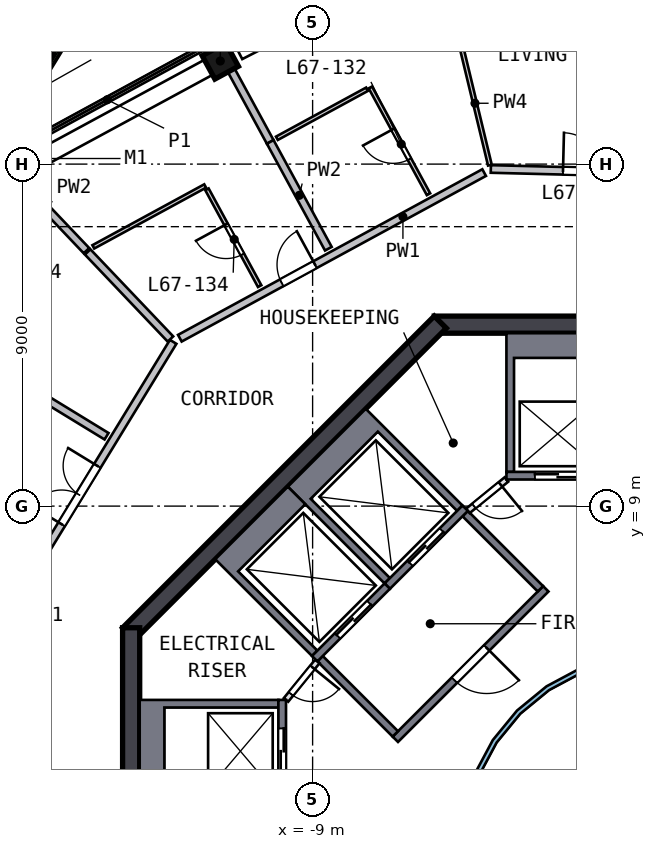
"""IFC4 building model, lengths in metres.
Left out: names, types, materials, properties, quantities, classifications, styles, units other than length and angle.
Written with IfcOpenShell. Run it as: python <this file> out.ifc"""

import sys

from ifc_helpers import new_model, si_unit, direction, frame, frame_2d, origin, origin_2d, place, context, subcontext, project, spatial, polyline, rectangle, outline, extrude, element, fill, save


model = new_model("IFC4")
c1 = context("Model", 3, precision=1e-05, world=origin(), true_north=direction((0.0, 1.0)))
c2 = subcontext(c1, "Body", "Model", "MODEL_VIEW")
j1 = project(units=[si_unit("LENGTHUNIT", "METRE"), si_unit("PLANEANGLEUNIT", "RADIAN")], contexts=[c1])
p1 = place(None, origin())
s1 = spatial("IfcSite", under=j1, at=p1, CompositionType="ELEMENT")
p2 = place(p1, origin())
s2 = spatial("IfcBuilding", under=s1, at=p2, CompositionType="ELEMENT")
p3 = place(p2, frame((0.0, 0.0, 274.0)))
s3 = spatial("IfcBuildingStorey", under=s2, at=p3, CompositionType="ELEMENT", Elevation=274.0)
p4 = place(p3, frame((-11.311, 20.78, 0.0), z_axis=(-0.0984061, -0.054678505, 0.993643045), x_axis=(-0.872632983, -0.475225292, -0.112572636)))
e1 = element("IfcColumn", 1, at=p4, inside=s3, PredefinedType="COLUMN", context=c2, shape_type="SweptSolid", body=[
    extrude(rectangle(XDim=0.7, YDim=0.7, at=origin_2d()), origin(), (0.0, 0.0, 1.0), 3.21),
])
p5 = place(p3, frame((5.799, 13.775, 0.0), z_axis=(0.0, 0.0, 1.0), x_axis=(-1.0, 0.0, 0.0)))
e2 = element("IfcWall", 2, at=p5, inside=s3, PredefinedType="SHEAR", context=c2, shape_type="SweptSolid", body=[
    extrude(rectangle(XDim=11.598, YDim=0.45, at=frame_2d((5.799, 0.0))), origin(), (0.0, 0.0, 1.0), 3.5),
])
p6 = place(p5, frame((4.899, 0.0, 0.0)))
e3 = element("IfcOpeningElement", 3, at=p6, cuts=e2, PredefinedType="OPENING", context=c2, shape_type="SweptSolid", body=[
    extrude(rectangle(XDim=1.8, YDim=2.1, at=frame_2d((0.9, 1.05))), frame((0.0, 0.235, 0.0), z_axis=(0.0, -1.0, 0.0), x_axis=(1.0, 0.0, 0.0)), (0.0, 0.0, 1.0), 0.47),
])
p7 = place(p3, frame((-5.64, 13.841, 0.0), z_axis=(0.0, 0.0, 1.0), x_axis=(-0.707106781, -0.707106781, 0.0)))
e4 = element("IfcWall", 4, at=p7, inside=s3, PredefinedType="SHEAR", context=c2, shape_type="SweptSolid", body=[
    extrude(rectangle(XDim=11.598, YDim=0.45, at=frame_2d((5.799, 0.0))), origin(), (0.0, 0.0, 1.0), 3.5),
])
p8 = place(p3, frame((-13.775, 5.799, 0.0), z_axis=(0.0, 0.0, 1.0), x_axis=(0.0, -1.0, 0.0)))
e5 = element("IfcWall", 5, at=p8, inside=s3, PredefinedType="SHEAR", context=c2, shape_type="SweptSolid", body=[
    extrude(rectangle(XDim=11.598, YDim=0.45, at=frame_2d((5.799, 0.0))), origin(), (0.0, 0.0, 1.0), 3.5),
])
p9 = place(p8, frame((4.899, 0.0, 0.0)))
e6 = element("IfcOpeningElement", 6, at=p9, cuts=e5, PredefinedType="OPENING", context=c2, shape_type="SweptSolid", body=[
    extrude(rectangle(XDim=1.8, YDim=2.1, at=frame_2d((0.9, 1.05))), frame((0.0, 0.235, 0.0), z_axis=(0.0, -1.0, 0.0), x_axis=(1.0, 0.0, 0.0)), (0.0, 0.0, 1.0), 0.47),
])
p10 = place(p3, frame((-17.519, 18.33, 0.0), z_axis=(0.0, 0.0, 1.0), x_axis=(0.521638307, 0.853166735, 0.0)))
e7 = element("IfcWall", 7, at=p10, inside=s3, PredefinedType="SOLIDWALL", context=c2, shape_type="SweptSolid", body=[
    extrude(rectangle(XDim=3.199, YDim=0.5, at=frame_2d((1.6, 0.0))), origin(), (0.0, 0.0, 1.0), 0.7),
])
p11 = place(p3, origin())
e8 = element("IfcWall", 8, at=p11, inside=s3, PredefinedType="SOLIDWALL", context=c2, shape_type="SweptSolid", body=[
    extrude(outline(polyline([(-3.9, 13.55), (-1.2, 13.55), (-1.2, 9.9), (-1.4, 9.9), (-1.4, 12.9), (-3.7, 12.9), (-3.7, 9.9), (-3.9, 9.9), (-3.9, 13.55)])), origin(), (0.0, 0.0, 1.0), 3.19),
])
p12 = place(p3, frame((-1.2, 9.8, 0.0), z_axis=(0.0, 0.0, 1.0), x_axis=(-1.0, 0.0, 0.0)))
e9 = element("IfcWall", 9, at=p12, inside=s3, PredefinedType="SOLIDWALL", context=c2, shape_type="SweptSolid", body=[
    extrude(rectangle(XDim=2.7, YDim=0.2, at=frame_2d((1.35, 0.0))), origin(), (0.0, 0.0, 1.0), 3.19),
])
p13 = place(p12, frame((0.75, 0.0, 0.0)))
e10 = element("IfcOpeningElement", 10, at=p13, cuts=e9, PredefinedType="OPENING", context=c2, shape_type="SweptSolid", body=[
    extrude(rectangle(XDim=1.2, YDim=2.1, at=frame_2d((0.6, 1.05))), frame((0.0, 0.11, 0.0), z_axis=(0.0, -1.0, 0.0), x_axis=(1.0, 0.0, 0.0)), (0.0, 0.0, 1.0), 0.22),
])
p14 = place(p3, origin())
e11 = element("IfcWall", 11, at=p14, inside=s3, PredefinedType="SOLIDWALL", context=c2, shape_type="SweptSolid", body=[
    extrude(outline(polyline([(-13.55, 3.9), (-9.9, 3.9), (-9.9, 3.7), (-12.9, 3.7), (-12.9, 1.4), (-9.9, 1.4), (-9.9, 1.2), (-13.55, 1.2), (-13.55, 3.9)])), origin(), (0.0, 0.0, 1.0), 3.19),
])
p15 = place(p3, frame((-9.8, 1.2, 0.0), z_axis=(0.0, 0.0, 1.0), x_axis=(0.0, 1.0, 0.0)))
e12 = element("IfcWall", 12, at=p15, inside=s3, PredefinedType="SOLIDWALL", context=c2, shape_type="SweptSolid", body=[
    extrude(rectangle(XDim=2.7, YDim=0.2, at=frame_2d((1.35, 0.0))), origin(), (0.0, 0.0, 1.0), 3.19),
])
p16 = place(p15, frame((0.75, 0.0, 0.0)))
e13 = element("IfcOpeningElement", 13, at=p16, cuts=e12, PredefinedType="OPENING", context=c2, shape_type="SweptSolid", body=[
    extrude(rectangle(XDim=1.2, YDim=2.1, at=frame_2d((0.6, 1.05))), frame((0.0, 0.11, 0.0), z_axis=(0.0, -1.0, 0.0), x_axis=(1.0, 0.0, 0.0)), (0.0, 0.0, 1.0), 0.22),
])
p17 = place(p3, origin())
e14 = element("IfcWall", 14, at=p17, inside=s3, PredefinedType="SOLIDWALL", context=c2, shape_type="SweptSolid", body=[
    extrude(outline(polyline([(-9.652, 9.51), (-7.601, 11.561), (-5.056, 9.016), (-5.197, 8.874), (-7.283, 10.96), (-9.051, 9.192), (-6.965, 7.106), (-7.106, 6.965), (-9.652, 9.51)])), origin(), (0.0, 0.0, 1.0), 3.19),
])
p18 = place(p3, frame((-4.985, 8.945, 0.0), z_axis=(0.0, 0.0, 1.0), x_axis=(-0.707106781, -0.707106781, 0.0)))
e15 = element("IfcWall", 15, at=p18, inside=s3, PredefinedType="SOLIDWALL", context=c2, shape_type="SweptSolid", body=[
    extrude(rectangle(XDim=2.9, YDim=0.2, at=frame_2d((1.45, 0.0))), origin(), (0.0, 0.0, 1.0), 3.19),
])
p19 = place(p18, frame((0.85, 0.0, 0.0)))
e16 = element("IfcOpeningElement", 16, at=p19, cuts=e15, PredefinedType="OPENING", context=c2, shape_type="SweptSolid", body=[
    extrude(rectangle(XDim=1.2, YDim=2.1, at=frame_2d((0.6, 1.05))), frame((0.0, 0.11, 0.0), z_axis=(0.0, -1.0, 0.0), x_axis=(1.0, 0.0, 0.0)), (0.0, 0.0, 1.0), 0.22),
])
p20 = place(p3, origin())
e17 = element("IfcWall", 17, at=p20, inside=s3, PredefinedType="SOLIDWALL", context=c2, shape_type="SweptSolid", body=[
    extrude(outline(polyline([(-11.561, 7.601), (-9.652, 9.51), (-9.192, 9.051), (-10.96, 7.283), (-8.874, 5.197), (-9.016, 5.056), (-11.561, 7.601)])), origin(), (0.0, 0.0, 1.0), 3.19),
])
p21 = place(p3, frame((-7.036, 6.894, 0.0), z_axis=(0.0, 0.0, 1.0), x_axis=(-0.707106781, -0.707106781, 0.0)))
e18 = element("IfcWall", 18, at=p21, inside=s3, PredefinedType="SOLIDWALL", context=c2, shape_type="SweptSolid", body=[
    extrude(rectangle(XDim=2.7, YDim=0.2, at=frame_2d((1.35, 0.0))), origin(), (0.0, 0.0, 1.0), 3.19),
])
p22 = place(p21, frame((0.65, 0.0, 0.0)))
e19 = element("IfcOpeningElement", 19, at=p22, cuts=e18, PredefinedType="OPENING", context=c2, shape_type="SweptSolid", body=[
    extrude(rectangle(XDim=1.2, YDim=2.1, at=frame_2d((0.6, 1.05))), frame((0.0, 0.11, 0.0), z_axis=(0.0, -1.0, 0.0), x_axis=(1.0, 0.0, 0.0)), (0.0, 0.0, 1.0), 0.22),
])
p23 = place(p3, frame((-2.864, 6.823, 0.0), z_axis=(0.0, 0.0, 1.0), x_axis=(-0.707106781, -0.707106781, 0.0)))
e20 = element("IfcWall", 20, at=p23, inside=s3, PredefinedType="SOLIDWALL", context=c2, shape_type="SweptSolid", body=[
    extrude(rectangle(XDim=5.6, YDim=0.2, at=frame_2d((2.8, 0.0))), origin(), (0.0, 0.0, 1.0), 3.19),
])
p24 = place(p23, frame((2.2, 0.0, 0.0)))
e21 = element("IfcOpeningElement", 21, at=p24, cuts=e20, PredefinedType="OPENING", context=c2, shape_type="SweptSolid", body=[
    extrude(rectangle(XDim=1.2, YDim=2.1, at=frame_2d((0.6, 1.05))), frame((0.0, 0.11, 0.0), z_axis=(0.0, -1.0, 0.0), x_axis=(1.0, 0.0, 0.0)), (0.0, 0.0, 1.0), 0.22),
])
for number, where, z_axis, x_axis in (
    (22, (-3.005, 6.823, 0.0), (0.0, 0.0, 1.0), (-0.707, 0.707, 0.0)),
    (23, (-6.823, 3.005, 0.0), (0.0, 0.0, 1.0), (-0.707, 0.707, 0.0)),
):
    element("IfcWall", number, at=place(p3, frame(where, z_axis=z_axis, x_axis=x_axis)), inside=s3, PredefinedType="SOLIDWALL", context=c2, shape_type="SweptSolid", body=[
        extrude(rectangle(XDim=2.8, YDim=0.2, at=frame_2d((1.4, 0.0))), origin(), (0.0, 0.0, 1.0), 3.19),
    ])
p25 = place(p3, frame((-3.9, 9.7, 0.0), z_axis=(0.0, 0.0, 1.0), x_axis=(-0.775559878, -0.631274009, 0.0)))
e24 = element("IfcWall", 24, at=p25, inside=s3, PredefinedType="PARTITIONING", context=c2, shape_type="SweptSolid", body=[
    extrude(rectangle(XDim=1.308, YDim=0.15, at=frame_2d((0.654, 0.0))), origin(), (0.0, 0.0, 1.0), 3.19),
])
p26 = place(p25, frame((0.204, 0.0, 0.0)))
e25 = element("IfcOpeningElement", 25, at=p26, cuts=e24, PredefinedType="OPENING", context=c2, shape_type="SweptSolid", body=[
    extrude(rectangle(XDim=0.9, YDim=2.1, at=frame_2d((0.45, 1.05))), frame((0.0, 0.085, 0.0), z_axis=(0.0, -1.0, 0.0), x_axis=(1.0, 0.0, 0.0)), (0.0, 0.0, 1.0), 0.17),
])
p27 = place(p3, frame((-8.874, 4.914, 0.0), z_axis=(0.0, 0.0, 1.0), x_axis=(-0.631274009, -0.775559878, 0.0)))
e26 = element("IfcWall", 26, at=p27, inside=s3, PredefinedType="PARTITIONING", context=c2, shape_type="SweptSolid", body=[
    extrude(rectangle(XDim=1.308, YDim=0.15, at=frame_2d((0.654, 0.0))), origin(), (0.0, 0.0, 1.0), 3.19),
])
p28 = place(p27, frame((0.204, 0.0, 0.0)))
e27 = element("IfcOpeningElement", 27, at=p28, cuts=e26, PredefinedType="OPENING", context=c2, shape_type="SweptSolid", body=[
    extrude(rectangle(XDim=0.9, YDim=2.1, at=frame_2d((0.45, 1.05))), frame((0.0, 0.085, 0.0), z_axis=(0.0, -1.0, 0.0), x_axis=(1.0, 0.0, 0.0)), (0.0, 0.0, 1.0), 0.17),
])
p29 = place(p3, origin())
e28 = element("IfcWall", 28, at=p29, inside=s3, PredefinedType="SOLIDWALL", context=c2, shape_type="SweptSolid", body=[
    extrude(outline(polyline([(5.021, -0.999), (4.73, -1.959), (4.257, -2.844), (3.62, -3.62), (2.844, -4.257), (1.959, -4.73), (0.999, -5.021), (0.0, -5.12), (-0.999, -5.021), (-1.959, -4.73), (-2.844, -4.257), (-3.62, -3.62), (-4.257, -2.844), (-4.73, -1.959), (-5.021, -0.999), (-5.12, 0.0), (-5.021, 0.999), (-4.73, 1.959), (-4.257, 2.844), (-3.62, 3.62), (-2.844, 4.257), (-1.959, 4.73), (-0.999, 5.021), (0.0, 5.12), (0.999, 5.021), (1.959, 4.73), (2.844, 4.257), (3.62, 3.62), (4.257, 2.844), (4.73, 1.959), (5.021, 0.999), (5.12, 0.0), (5.021, -0.999)]), holes=[polyline([(4.904, 0.976), (4.619, 1.913), (4.157, 2.778), (3.535, 3.535), (2.778, 4.157), (1.913, 4.619), (0.976, 4.904), (0.0, 5.0), (-0.976, 4.904), (-1.913, 4.619), (-2.778, 4.157), (-3.535, 3.535), (-4.157, 2.778), (-4.619, 1.913), (-4.904, 0.976), (-5.0, 0.0), (-4.904, -0.976), (-4.619, -1.913), (-4.157, -2.778), (-3.535, -3.535), (-2.778, -4.157), (-1.913, -4.619), (-0.976, -4.904), (0.0, -5.0), (0.976, -4.904), (1.913, -4.619), (2.778, -4.157), (3.535, -3.535), (4.157, -2.778), (4.619, -1.913), (4.904, -0.976), (5.0, 0.0), (4.904, 0.976)])]), origin(), (0.0, 0.0, 1.0), 3.19),
])
p30 = place(p3, frame((-17.644, 5.186, 0.0), z_axis=(0.0, 0.0, 1.0), x_axis=(0.521608435, 0.853184998, 0.0)))
e29 = element("IfcWall", 29, at=p30, inside=s3, PredefinedType="SOLIDWALL", context=c2, shape_type="SweptSolid", body=[
    extrude(rectangle(XDim=9.537, YDim=0.2, at=frame_2d((4.768, 0.0))), origin(), (0.0, 0.0, 1.0), 3.19),
])
p31 = place(p30, frame((3.912, 0.0, 0.0)))
e30 = element("IfcOpeningElement", 30, at=p31, cuts=e29, PredefinedType="OPENING", context=c2, shape_type="SweptSolid", body=[
    extrude(rectangle(XDim=1.8, YDim=2.1, at=frame_2d((0.9, 1.05))), frame((0.0, 0.11, 0.0), z_axis=(0.0, -1.0, 0.0), x_axis=(1.0, 0.0, 0.0)), (0.0, 0.0, 1.0), 0.22),
])
p32 = place(p3, frame((-12.493, 13.418, 0.0), z_axis=(0.0, 0.0, 1.0), x_axis=(0.878320972, 0.478071407, 0.0)))
e31 = element("IfcWall", 31, at=p32, inside=s3, PredefinedType="SOLIDWALL", context=c2, shape_type="SweptSolid", body=[
    extrude(rectangle(XDim=9.117, YDim=0.2, at=frame_2d((4.558, 0.0))), origin(), (0.0, 0.0, 1.0), 3.19),
])
p33 = place(p32, frame((3.05, 0.0, 0.0)))
e32 = element("IfcOpeningElement", 32, at=p33, cuts=e31, PredefinedType="OPENING", context=c2, shape_type="SweptSolid", body=[
    extrude(rectangle(XDim=1.0, YDim=2.1, at=frame_2d((0.5, 1.05))), frame((0.0, 0.11, 0.0), z_axis=(0.0, -1.0, 0.0), x_axis=(1.0, 0.0, 0.0)), (0.0, 0.0, 1.0), 0.22),
])
p34 = place(p3, frame((-4.311, 17.872, 0.0), z_axis=(0.0, 0.0, 1.0), x_axis=(0.99968415, -0.025131651, 0.0)))
e33 = element("IfcWall", 33, at=p34, inside=s3, PredefinedType="SOLIDWALL", context=c2, shape_type="SweptSolid", body=[
    extrude(rectangle(XDim=9.316, YDim=0.2, at=frame_2d((4.658, 0.0))), origin(), (0.0, 0.0, 1.0), 3.19),
])
p35 = place(p34, frame((1.9, 0.0, 0.0)))
e34 = element("IfcOpeningElement", 34, at=p35, cuts=e33, PredefinedType="OPENING", context=c2, shape_type="SweptSolid", body=[
    extrude(rectangle(XDim=1.0, YDim=2.1, at=frame_2d((0.5, 1.05))), frame((0.0, 0.11, 0.0), z_axis=(0.0, -1.0, 0.0), x_axis=(1.0, 0.0, 0.0)), (0.0, 0.0, 1.0), 0.22),
])
p36 = place(p3, frame((-23.212, 16.212, 0.0), z_axis=(0.0, 0.0, 1.0), x_axis=(0.853189263, -0.521601458, 0.0)))
e35 = element("IfcWall", 35, at=p36, inside=s3, PredefinedType="SOLIDWALL", context=c2, shape_type="SweptSolid", body=[
    extrude(rectangle(XDim=10.302, YDim=0.2, at=frame_2d((5.151, 0.0))), origin(), (0.0, 0.0, 1.0), 3.19),
])
p37 = place(p36, frame((2.5, 0.0, 0.0)))
e36 = element("IfcOpeningElement", 36, at=p37, cuts=e35, PredefinedType="OPENING", context=c2, shape_type="SweptSolid", body=[
    extrude(rectangle(XDim=1.0, YDim=2.1, at=frame_2d((0.5, 1.05))), frame((0.0, 0.11, 0.0), z_axis=(0.0, -1.0, 0.0), x_axis=(1.0, 0.0, 0.0)), (0.0, 0.0, 1.0), 0.22),
])
p38 = place(p3, frame((-17.203, 18.09, 0.0), z_axis=(0.0, 0.0, 1.0), x_axis=(0.689106643, -0.724659944, 0.0)))
e37 = element("IfcWall", 37, at=p38, inside=s3, PredefinedType="SOLIDWALL", context=c2, shape_type="SweptSolid", body=[
    extrude(rectangle(XDim=3.269, YDim=0.2, at=frame_2d((1.634, 0.0))), origin(), (0.0, 0.0, 1.0), 3.19),
])
p39 = place(p3, frame((-14.919, 15.688, 0.0), z_axis=(0.0, 0.0, 1.0), x_axis=(0.689161356, -0.724607912, 0.0)))
e38 = element("IfcWall", 38, at=p39, inside=s3, PredefinedType="SOLIDWALL", context=c2, shape_type="SweptSolid", body=[
    extrude(rectangle(XDim=3.161, YDim=0.2, at=frame_2d((1.581, 0.0))), origin(), (0.0, 0.0, 1.0), 3.19),
])
p40 = place(p3, frame((-10.115, 18.584, 0.0), z_axis=(0.0, 0.0, 1.0), x_axis=(-0.478092371, 0.878309561, 0.0)))
e39 = element("IfcWall", 39, at=p40, inside=s3, PredefinedType="SOLIDWALL", context=c2, shape_type="SweptSolid", body=[
    extrude(rectangle(XDim=2.95, YDim=0.2, at=frame_2d((1.475, 0.0))), origin(), (0.0, 0.0, 1.0), 3.19),
])
p41 = place(p3, frame((-8.585, 15.773, 0.0), z_axis=(0.0, 0.0, 1.0), x_axis=(-0.478071486, 0.878320929, 0.0)))
e40 = element("IfcWall", 40, at=p41, inside=s3, PredefinedType="SOLIDWALL", context=c2, shape_type="SweptSolid", body=[
    extrude(rectangle(XDim=3.2, YDim=0.2, at=frame_2d((1.6, 0.0))), origin(), (0.0, 0.0, 1.0), 3.19),
])
p42 = place(p3, frame((-14.77, 15.822, 0.0), z_axis=(0.0, 0.0, 1.0), x_axis=(0.878304625, 0.478101439, 0.0)))
e41 = element("IfcWall", 41, at=p42, inside=s3, PredefinedType="PARTITIONING", context=c2, shape_type="SweptSolid", body=[
    extrude(rectangle(XDim=3.35, YDim=0.1, at=frame_2d((1.675, 0.0))), origin(), (0.0, 0.0, 1.0), 3.19),
])
p43 = place(p3, frame((-10.393, 14.789, 0.0), z_axis=(0.0, 0.0, 1.0), x_axis=(-0.478091061, 0.878310274, 0.0)))
e42 = element("IfcWall", 42, at=p43, inside=s3, PredefinedType="PARTITIONING", context=c2, shape_type="SweptSolid", body=[
    extrude(rectangle(XDim=2.9, YDim=0.1, at=frame_2d((1.45, 0.0))), origin(), (0.0, 0.0, 1.0), 3.19),
])
p44 = place(p43, frame((0.95, 0.0, 0.0)))
e43 = element("IfcOpeningElement", 43, at=p44, cuts=e42, PredefinedType="OPENING", context=c2, shape_type="SweptSolid", body=[
    extrude(rectangle(XDim=0.9, YDim=2.1, at=frame_2d((0.45, 1.05))), frame((0.0, 0.06, 0.0), z_axis=(0.0, -1.0, 0.0), x_axis=(1.0, 0.0, 0.0)), (0.0, 0.0, 1.0), 0.12),
])
p45 = place(p3, frame((-7.568, 19.97, 0.0), z_axis=(0.0, 0.0, 1.0), x_axis=(-0.878296088, -0.478117121, 0.0)))
e44 = element("IfcWall", 44, at=p45, inside=s3, PredefinedType="PARTITIONING", context=c2, shape_type="SweptSolid", body=[
    extrude(rectangle(XDim=2.7, YDim=0.1, at=frame_2d((1.35, 0.0))), origin(), (0.0, 0.0, 1.0), 3.19),
])
p46 = place(p3, frame((-5.95, 17.207, 0.0), z_axis=(0.0, 0.0, 1.0), x_axis=(-0.478098304, 0.878306331, 0.0)))
e45 = element("IfcWall", 45, at=p46, inside=s3, PredefinedType="PARTITIONING", context=c2, shape_type="SweptSolid", body=[
    extrude(rectangle(XDim=3.2, YDim=0.1, at=frame_2d((1.6, 0.0))), origin(), (0.0, 0.0, 1.0), 3.19),
])
p47 = place(p46, frame((1.05, 0.0, 0.0)))
e46 = element("IfcOpeningElement", 46, at=p47, cuts=e45, PredefinedType="OPENING", context=c2, shape_type="SweptSolid", body=[
    extrude(rectangle(XDim=0.9, YDim=2.1, at=frame_2d((0.45, 1.05))), frame((0.0, 0.06, 0.0), z_axis=(0.0, -1.0, 0.0), x_axis=(1.0, 0.0, 0.0)), (0.0, 0.0, 1.0), 0.12),
])
p48 = place(p3, frame((-4.335, 17.973, 0.0), z_axis=(0.0, 0.0, 1.0), x_axis=(-0.234490664, 0.972118372, 0.0)))
e47 = element("IfcWall", 47, at=p48, inside=s3, PredefinedType="PARTITIONING", context=c2, shape_type="SweptSolid", body=[
    extrude(rectangle(XDim=6.476, YDim=0.1, at=frame_2d((3.238, 0.0))), origin(), (0.0, 0.0, 1.0), 3.19),
])
p49 = place(p48, frame((3.55, 0.0, 0.0)))
e48 = element("IfcOpeningElement", 48, at=p49, cuts=e47, PredefinedType="OPENING", context=c2, shape_type="SweptSolid", body=[
    extrude(rectangle(XDim=1.0, YDim=2.1, at=frame_2d((0.5, 1.05))), frame((0.0, 0.06, 0.0), z_axis=(0.0, -1.0, 0.0), x_axis=(1.0, 0.0, 0.0)), (0.0, 0.0, 1.0), 0.12),
])
p50 = place(p13, origin())
e49 = element("IfcDoor", 49, at=p50, inside=s3, OperationType="DOUBLE_DOOR_SLIDING", PredefinedType="DOOR", context=c2, shape_type="SweptSolid", body=[
    extrude(rectangle(XDim=1.2, YDim=2.1, at=frame_2d((0.6, 1.05))), frame((0.0, 0.025, 0.0), z_axis=(0.0, -1.0, 0.0), x_axis=(1.0, 0.0, 0.0)), (0.0, 0.0, 1.0), 0.05),
])
fill(e10, e49)
p51 = place(p16, origin())
e50 = element("IfcDoor", 50, at=p51, inside=s3, OperationType="DOUBLE_DOOR_SLIDING", PredefinedType="DOOR", context=c2, shape_type="SweptSolid", body=[
    extrude(rectangle(XDim=1.2, YDim=2.1, at=frame_2d((0.6, 1.05))), frame((0.0, 0.025, 0.0), z_axis=(0.0, -1.0, 0.0), x_axis=(1.0, 0.0, 0.0)), (0.0, 0.0, 1.0), 0.05),
])
fill(e13, e50)
p52 = place(p19, origin())
e51 = element("IfcDoor", 51, at=p52, inside=s3, OperationType="DOUBLE_DOOR_SLIDING", PredefinedType="DOOR", context=c2, shape_type="SweptSolid", body=[
    extrude(rectangle(XDim=1.2, YDim=2.1, at=frame_2d((0.6, 1.05))), frame((0.0, 0.025, 0.0), z_axis=(0.0, -1.0, 0.0), x_axis=(1.0, 0.0, 0.0)), (0.0, 0.0, 1.0), 0.05),
])
fill(e16, e51)
p53 = place(p22, origin())
e52 = element("IfcDoor", 52, at=p53, inside=s3, OperationType="DOUBLE_DOOR_SLIDING", PredefinedType="DOOR", context=c2, shape_type="SweptSolid", body=[
    extrude(rectangle(XDim=1.2, YDim=2.1, at=frame_2d((0.6, 1.05))), frame((0.0, 0.025, 0.0), z_axis=(0.0, -1.0, 0.0), x_axis=(1.0, 0.0, 0.0)), (0.0, 0.0, 1.0), 0.05),
])
fill(e19, e52)
p54 = place(p24, origin())
e53 = element("IfcDoor", 53, at=p54, inside=s3, OperationType="SINGLE_SWING_LEFT", PredefinedType="DOOR", context=c2, shape_type="SweptSolid", body=[
    extrude(rectangle(XDim=1.2, YDim=2.1, at=frame_2d((0.6, 1.05))), frame((0.0, 0.025, 0.0), z_axis=(0.0, -1.0, 0.0), x_axis=(1.0, 0.0, 0.0)), (0.0, 0.0, 1.0), 0.05),
])
fill(e21, e53)
p55 = place(p26, origin())
e54 = element("IfcDoor", 54, at=p55, inside=s3, OperationType="SINGLE_SWING_LEFT", PredefinedType="DOOR", context=c2, shape_type="SweptSolid", body=[
    extrude(rectangle(XDim=0.9, YDim=2.1, at=frame_2d((0.45, 1.05))), frame((0.0, 0.025, 0.0), z_axis=(0.0, -1.0, 0.0), x_axis=(1.0, 0.0, 0.0)), (0.0, 0.0, 1.0), 0.05),
])
fill(e25, e54)
p56 = place(p28, origin())
e55 = element("IfcDoor", 55, at=p56, inside=s3, OperationType="SINGLE_SWING_LEFT", PredefinedType="DOOR", context=c2, shape_type="SweptSolid", body=[
    extrude(rectangle(XDim=0.9, YDim=2.1, at=frame_2d((0.45, 1.05))), frame((0.0, 0.025, 0.0), z_axis=(0.0, -1.0, 0.0), x_axis=(1.0, 0.0, 0.0)), (0.0, 0.0, 1.0), 0.05),
])
fill(e27, e55)
p57 = place(p31, origin())
e56 = element("IfcDoor", 56, at=p57, inside=s3, OperationType="DOUBLE_DOOR_SINGLE_SWING", PredefinedType="DOOR", context=c2, shape_type="SweptSolid", body=[
    extrude(rectangle(XDim=1.8, YDim=2.1, at=frame_2d((0.9, 1.05))), frame((0.0, 0.025, 0.0), z_axis=(0.0, -1.0, 0.0), x_axis=(1.0, 0.0, 0.0)), (0.0, 0.0, 1.0), 0.05),
])
fill(e30, e56)
p58 = place(p35, origin())
e57 = element("IfcDoor", 57, at=p58, inside=s3, OperationType="SINGLE_SWING_LEFT", PredefinedType="DOOR", context=c2, shape_type="SweptSolid", body=[
    extrude(rectangle(XDim=1.0, YDim=2.1, at=frame_2d((0.5, 1.05))), frame((0.0, 0.025, 0.0), z_axis=(0.0, -1.0, 0.0), x_axis=(1.0, 0.0, 0.0)), (0.0, 0.0, 1.0), 0.05),
])
fill(e34, e57)
p59 = place(p47, origin())
e58 = element("IfcDoor", 58, at=p59, inside=s3, OperationType="SINGLE_SWING_RIGHT", PredefinedType="DOOR", context=c2, shape_type="SweptSolid", body=[
    extrude(rectangle(XDim=0.9, YDim=2.1, at=frame_2d((0.45, 1.05))), frame((0.0, 0.025, 0.0), z_axis=(0.0, -1.0, 0.0), x_axis=(1.0, 0.0, 0.0)), (0.0, 0.0, 1.0), 0.05),
])
fill(e46, e58)
p60 = place(p33, origin())
e59 = element("IfcDoor", 59, at=p60, inside=s3, OperationType="SINGLE_SWING_RIGHT", PredefinedType="DOOR", context=c2, shape_type="SweptSolid", body=[
    extrude(rectangle(XDim=1.0, YDim=2.1, at=frame_2d((0.5, 1.05))), frame((0.0, 0.025, 0.0), z_axis=(0.0, -1.0, 0.0), x_axis=(1.0, 0.0, 0.0)), (0.0, 0.0, 1.0), 0.05),
])
fill(e32, e59)
p61 = place(p44, origin())
e60 = element("IfcDoor", 60, at=p61, inside=s3, OperationType="SINGLE_SWING_RIGHT", PredefinedType="DOOR", context=c2, shape_type="SweptSolid", body=[
    extrude(rectangle(XDim=0.9, YDim=2.1, at=frame_2d((0.45, 1.05))), frame((0.0, 0.025, 0.0), z_axis=(0.0, -1.0, 0.0), x_axis=(1.0, 0.0, 0.0)), (0.0, 0.0, 1.0), 0.05),
])
fill(e43, e60)
save(model, sys.argv[1])
